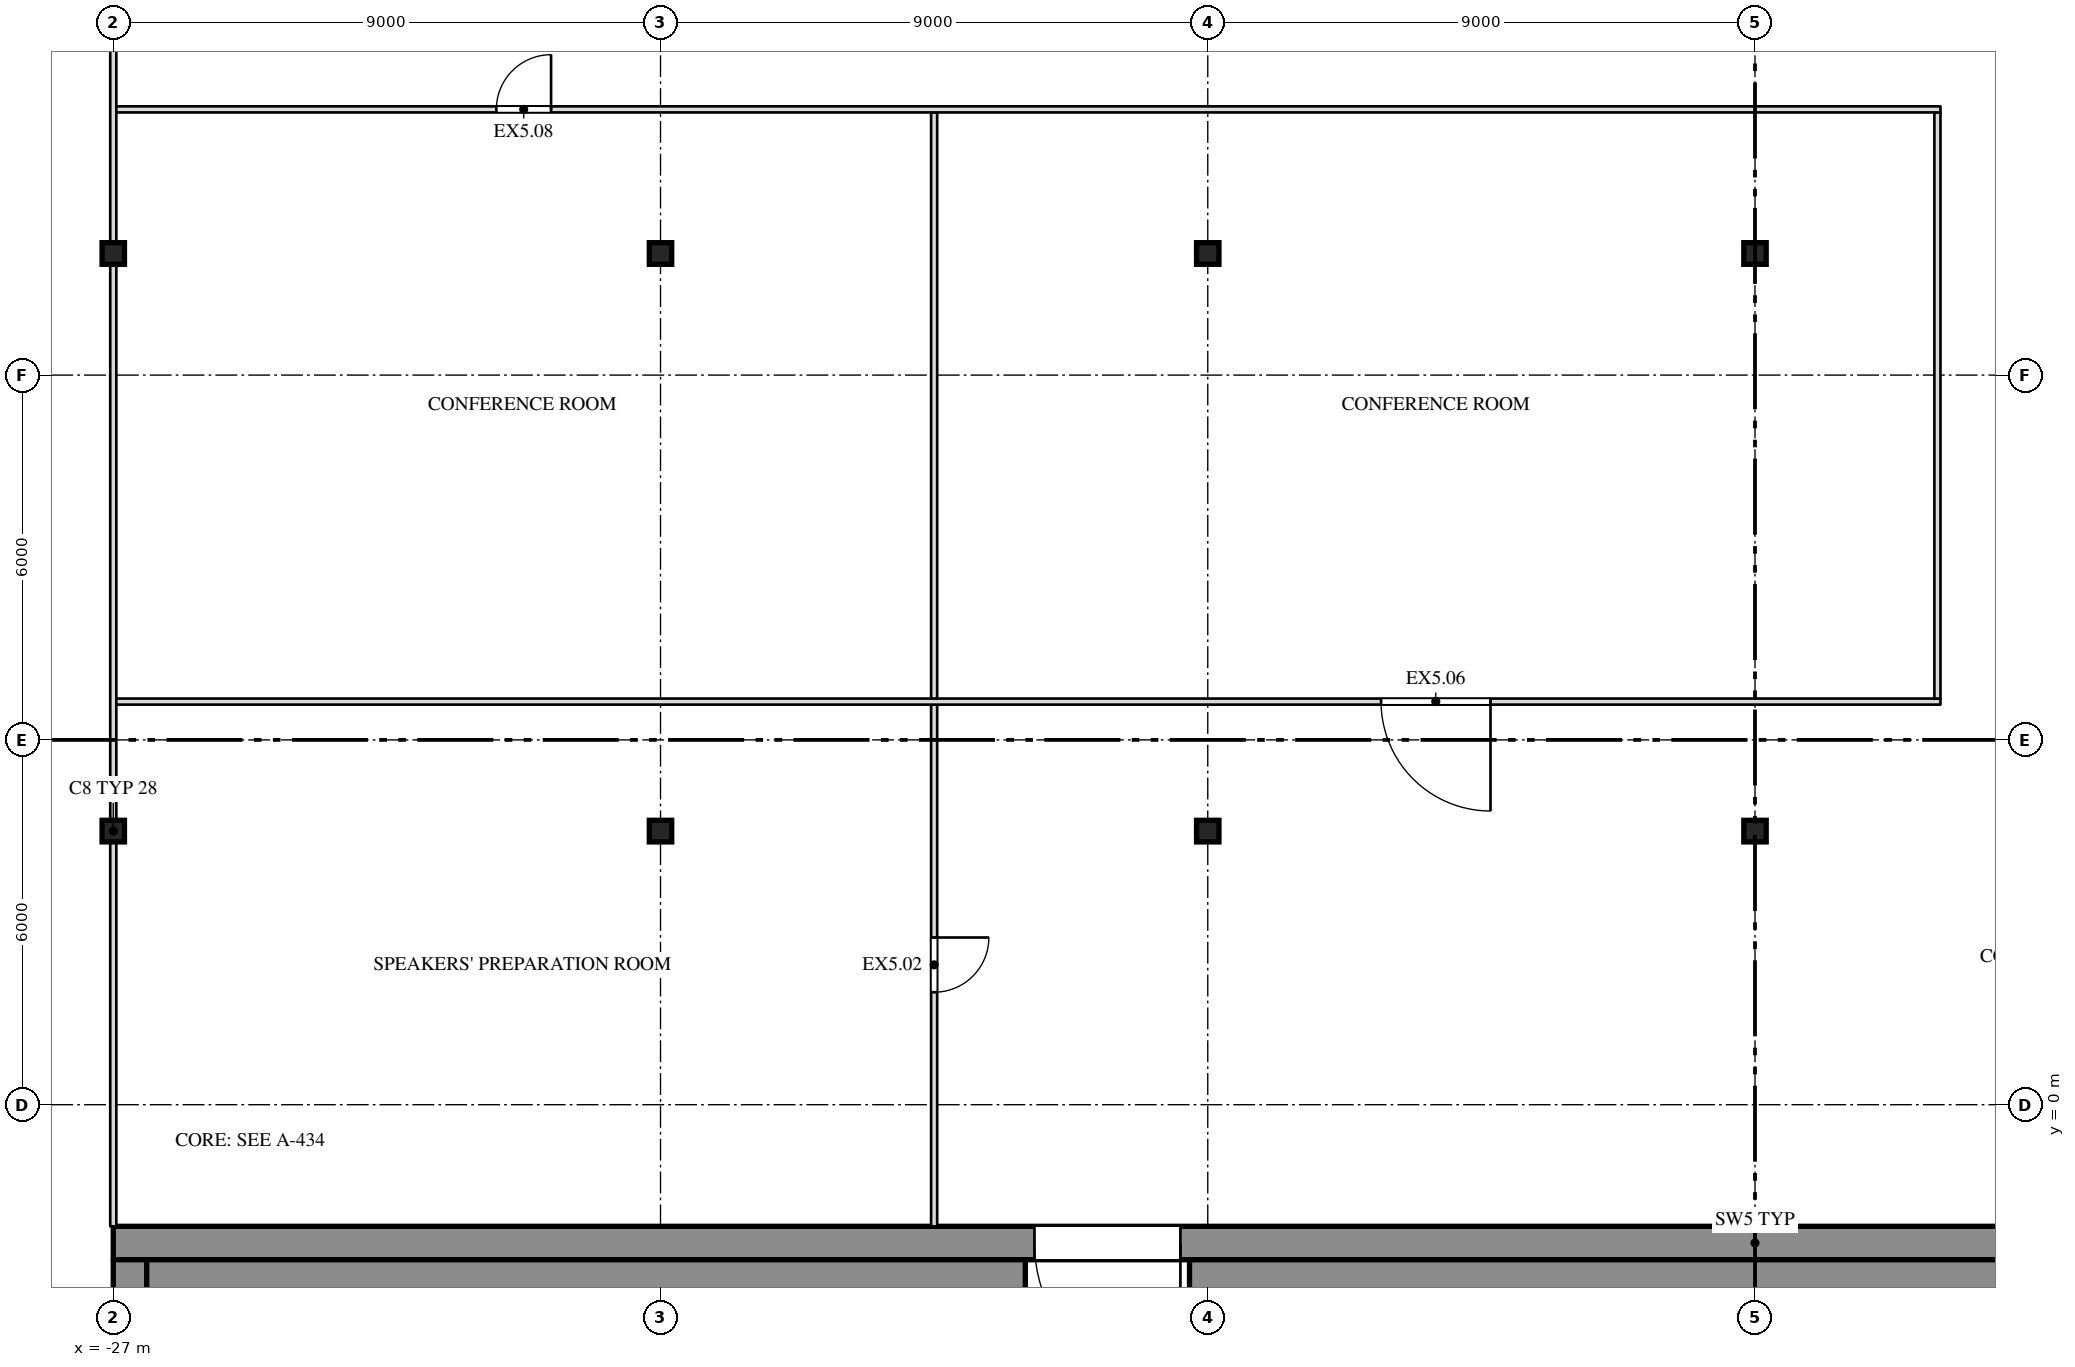
"""IFC4 building model, lengths in metres.
Left out: names, types, materials, properties, quantities, classifications, styles, units other than length and angle.
Written with IfcOpenShell. Run it as: python <this file> out.ifc"""

import sys

from ifc_helpers import new_model, si_unit, direction, frame, frame_2d, origin, origin_2d, place, context, subcontext, project, spatial, rectangle, i_section, extrude, element, fill, save


model = new_model("IFC4")
c1 = context("Model", 3, precision=1e-05, world=origin(), true_north=direction((0.0, 1.0)))
c2 = subcontext(c1, "Body", "Model", "MODEL_VIEW")
j1 = project(units=[si_unit("LENGTHUNIT", "METRE"), si_unit("PLANEANGLEUNIT", "RADIAN")], contexts=[c1])
p1 = place(None, origin())
s1 = spatial("IfcSite", under=j1, at=p1, CompositionType="ELEMENT")
p2 = place(p1, origin())
s2 = spatial("IfcBuilding", under=s1, at=p2, CompositionType="ELEMENT")
p3 = place(p2, frame((0.0, 0.0, 288.5)))
s3 = spatial("IfcBuildingStorey", under=s2, at=p3, CompositionType="ELEMENT", Elevation=288.5)
for number, where, z_axis, x_axis in (
    (1, (-27.0, 4.5, 0.0), (0.0, 0.0, 1.0), (1.0, 0.0, 0.0)),
    (2, (-18.0, 4.5, 0.0), (0.0, 0.0, 1.0), (1.0, 0.0, 0.0)),
    (3, (-9.0, 4.5, 0.0), (0.0, 0.0, 1.0), (1.0, 0.0, 0.0)),
    (4, (0.0, 4.5, 0.0), (0.0, 0.0, 1.0), (1.0, 0.0, 0.0)),
    (5, (-27.0, 14.0, 0.0), (0.0, 0.0, 1.0), (1.0, 0.0, 0.0)),
    (6, (-18.0, 14.0, 0.0), (0.0, 0.0, 1.0), (1.0, 0.0, 0.0)),
    (7, (-9.0, 14.0, 0.0), (0.0, 0.0, 1.0), (1.0, 0.0, 0.0)),
    (8, (0.0, 14.0, 0.0), (0.0, 0.0, 1.0), (1.0, 0.0, 0.0)),
):
    element("IfcColumn", number, at=place(p3, frame(where, z_axis=z_axis, x_axis=x_axis)), inside=s3, PredefinedType="COLUMN", context=c2, shape_type="SweptSolid", body=[
        extrude(i_section(OverallWidth=0.368, OverallDepth=0.356, WebThickness=0.011, FlangeThickness=0.018, at=origin_2d()), origin(), (0.0, 0.0, 1.0), 4.0),
    ])
p4 = place(p3, frame((-27.0, -2.275, 0.0), z_axis=(0.0, 0.0, 1.0), x_axis=(1.0, 0.0, 0.0)))
e9 = element("IfcWall", 9, at=p4, inside=s3, PredefinedType="SHEAR", context=c2, shape_type="SweptSolid", body=[
    extrude(rectangle(XDim=54.0, YDim=0.55, at=frame_2d((27.0, 0.0))), origin(), (0.0, 0.0, 1.0), 3.78),
])
p5 = place(p4, frame((15.15, 0.0, 0.0)))
e10 = element("IfcOpeningElement", 10, at=p5, cuts=e9, PredefinedType="OPENING", context=c2, shape_type="SweptSolid", body=[
    extrude(rectangle(XDim=2.4, YDim=2.1, at=frame_2d((1.2, 1.05))), frame((0.0, 0.287, 0.0), z_axis=(0.0, -1.0, 0.0), x_axis=(1.0, 0.0, 0.0)), (0.0, 0.0, 1.0), 0.574),
])
p6 = place(p4, frame((36.45, 0.0, 0.0)))
e11 = element("IfcOpeningElement", 11, at=p6, cuts=e9, PredefinedType="OPENING", context=c2, shape_type="SweptSolid", body=[
    extrude(rectangle(XDim=2.4, YDim=2.1, at=frame_2d((1.2, 1.05))), frame((0.0, 0.287, 0.0), z_axis=(0.0, -1.0, 0.0), x_axis=(1.0, 0.0, 0.0)), (0.0, 0.0, 1.0), 0.574),
])
p7 = place(p3, frame((-26.725, -13.45, 0.0), z_axis=(0.0, 0.0, 1.0), x_axis=(0.0, 1.0, 0.0)))
e12 = element("IfcWall", 12, at=p7, inside=s3, PredefinedType="SHEAR", context=c2, shape_type="SweptSolid", body=[
    extrude(rectangle(XDim=10.9, YDim=0.55, at=frame_2d((5.45, 0.0))), origin(), (0.0, 0.0, 1.0), 3.78),
])
p8 = place(p7, frame((4.662, 0.0, 0.0)))
e13 = element("IfcOpeningElement", 13, at=p8, cuts=e12, PredefinedType="OPENING", context=c2, shape_type="SweptSolid", body=[
    extrude(rectangle(XDim=2.4, YDim=2.1, at=frame_2d((1.2, 1.05))), frame((0.0, 0.287, 0.0), z_axis=(0.0, -1.0, 0.0), x_axis=(1.0, 0.0, 0.0)), (0.0, 0.0, 1.0), 0.574),
])
p9 = place(p3, frame((-26.45, -2.875, 0.0), z_axis=(0.0, 0.0, 1.0), x_axis=(1.0, 0.0, 0.0)))
e14 = element("IfcWall", 14, at=p9, inside=s3, PredefinedType="SHEAR", context=c2, shape_type="SweptSolid", body=[
    extrude(rectangle(XDim=14.45, YDim=0.65, at=frame_2d((7.225, 0.0))), origin(), (0.0, 0.0, 1.0), 3.78),
])
p10 = place(p3, frame((-9.3, -2.875, 0.0), z_axis=(0.0, 0.0, 1.0), x_axis=(1.0, 0.0, 0.0)))
e15 = element("IfcWall", 15, at=p10, inside=s3, PredefinedType="SHEAR", context=c2, shape_type="SweptSolid", body=[
    extrude(rectangle(XDim=18.6, YDim=0.65, at=frame_2d((9.3, 0.0))), origin(), (0.0, 0.0, 1.0), 3.78),
])
p11 = place(p3, frame((-27.0, -2.0, 0.0), z_axis=(0.0, 0.0, 1.0), x_axis=(0.0, 1.0, 0.0)))
e16 = element("IfcWall", 16, at=p11, inside=s3, PredefinedType="PARTITIONING", context=c2, shape_type="SweptSolid", body=[
    extrude(rectangle(XDim=6.322, YDim=0.1, at=frame_2d((3.161, 0.0))), origin(), (0.0, 0.0, 1.0), 3.247),
])
p12 = place(p3, frame((-27.0, 4.678, 0.0), z_axis=(0.0, 0.0, 1.0), x_axis=(0.0, 1.0, 0.0)))
e17 = element("IfcWall", 17, at=p12, inside=s3, PredefinedType="PARTITIONING", context=c2, shape_type="SweptSolid", body=[
    extrude(rectangle(XDim=9.145, YDim=0.1, at=frame_2d((4.572, 0.0))), origin(), (0.0, 0.0, 1.0), 3.247),
])
p13 = place(p3, frame((-27.0, 14.178, 0.0), z_axis=(0.0, 0.0, 1.0), x_axis=(0.0, 1.0, 0.0)))
e18 = element("IfcWall", 18, at=p13, inside=s3, PredefinedType="PARTITIONING", context=c2, shape_type="SweptSolid", body=[
    extrude(rectangle(XDim=7.012, YDim=0.1, at=frame_2d((3.506, 0.0))), origin(), (0.0, 0.0, 1.0), 3.247),
])
p14 = place(p3, frame((-13.5, -2.0, 0.0), z_axis=(0.0, 0.0, 1.0), x_axis=(0.0, 1.0, 0.0)))
e19 = element("IfcWall", 19, at=p14, inside=s3, PredefinedType="PARTITIONING", context=c2, shape_type="SweptSolid", body=[
    extrude(rectangle(XDim=8.58, YDim=0.1, at=frame_2d((4.29, 0.0))), origin(), (0.0, 0.0, 1.0), 3.254),
])
p15 = place(p14, frame((3.85, 0.0, 0.0)))
e20 = element("IfcOpeningElement", 20, at=p15, cuts=e19, PredefinedType="OPENING", context=c2, shape_type="SweptSolid", body=[
    extrude(rectangle(XDim=0.9, YDim=2.1, at=frame_2d((0.45, 1.05))), frame((0.0, 0.062, 0.0), z_axis=(0.0, -1.0, 0.0), x_axis=(1.0, 0.0, 0.0)), (0.0, 0.0, 1.0), 0.124),
])
p16 = place(p3, frame((-26.95, 6.63, 0.0), z_axis=(0.0, 0.0, 1.0), x_axis=(1.0, 0.0, 0.0)))
e21 = element("IfcWall", 21, at=p16, inside=s3, PredefinedType="PARTITIONING", context=c2, shape_type="SweptSolid", body=[
    extrude(rectangle(XDim=30.0, YDim=0.1, at=frame_2d((15.0, 0.0))), origin(), (0.0, 0.0, 1.0), 3.78),
])
p17 = place(p16, frame((20.8, 0.0, 0.0)))
e22 = element("IfcOpeningElement", 22, at=p17, cuts=e21, PredefinedType="OPENING", context=c2, shape_type="SweptSolid", body=[
    extrude(rectangle(XDim=1.8, YDim=2.1, at=frame_2d((0.9, 1.05))), frame((0.0, 0.062, 0.0), z_axis=(0.0, -1.0, 0.0), x_axis=(1.0, 0.0, 0.0)), (0.0, 0.0, 1.0), 0.124),
])
p18 = place(p3, frame((-13.5, 6.68, 0.0), z_axis=(0.0, 0.0, 1.0), x_axis=(0.0, 1.0, 0.0)))
e23 = element("IfcWall", 23, at=p18, inside=s3, PredefinedType="PARTITIONING", context=c2, shape_type="SweptSolid", body=[
    extrude(rectangle(XDim=9.64, YDim=0.1, at=frame_2d((4.82, 0.0))), origin(), (0.0, 0.0, 1.0), 3.254),
])
p19 = place(p3, frame((3.0, 6.68, 0.0), z_axis=(0.0, 0.0, 1.0), x_axis=(0.0, 1.0, 0.0)))
e24 = element("IfcWall", 24, at=p19, inside=s3, PredefinedType="PARTITIONING", context=c2, shape_type="SweptSolid", body=[
    extrude(rectangle(XDim=9.64, YDim=0.1, at=frame_2d((4.82, 0.0))), origin(), (0.0, 0.0, 1.0), 3.78),
])
p20 = place(p3, frame((-26.95, 16.37, 0.0), z_axis=(0.0, 0.0, 1.0), x_axis=(1.0, 0.0, 0.0)))
e25 = element("IfcWall", 25, at=p20, inside=s3, PredefinedType="PARTITIONING", context=c2, shape_type="SweptSolid", body=[
    extrude(rectangle(XDim=30.0, YDim=0.1, at=frame_2d((15.0, 0.0))), origin(), (0.0, 0.0, 1.0), 3.78),
])
p21 = place(p20, frame((6.25, 0.0, 0.0)))
e26 = element("IfcOpeningElement", 26, at=p21, cuts=e25, PredefinedType="OPENING", context=c2, shape_type="SweptSolid", body=[
    extrude(rectangle(XDim=0.9, YDim=2.1, at=frame_2d((0.45, 1.05))), frame((0.0, 0.062, 0.0), z_axis=(0.0, -1.0, 0.0), x_axis=(1.0, 0.0, 0.0)), (0.0, 0.0, 1.0), 0.124),
])
p22 = place(p15, origin())
e27 = element("IfcDoor", 27, at=p22, inside=s3, OperationType="SINGLE_SWING_LEFT", PredefinedType="DOOR", context=c2, shape_type="SweptSolid", body=[
    extrude(rectangle(XDim=0.9, YDim=2.1, at=frame_2d((0.45, 1.05))), frame((0.0, 0.025, 0.0), z_axis=(0.0, -1.0, 0.0), x_axis=(1.0, 0.0, 0.0)), (0.0, 0.0, 1.0), 0.05),
])
fill(e20, e27)
p23 = place(p17, origin())
e28 = element("IfcDoor", 28, at=p23, inside=s3, OperationType="DOUBLE_DOOR_SINGLE_SWING", PredefinedType="DOOR", context=c2, shape_type="SweptSolid", body=[
    extrude(rectangle(XDim=1.8, YDim=2.1, at=frame_2d((0.9, 1.05))), frame((0.0, 0.025, 0.0), z_axis=(0.0, -1.0, 0.0), x_axis=(1.0, 0.0, 0.0)), (0.0, 0.0, 1.0), 0.05),
])
fill(e22, e28)
p24 = place(p21, origin())
e29 = element("IfcDoor", 29, at=p24, inside=s3, OperationType="SINGLE_SWING_RIGHT", PredefinedType="DOOR", context=c2, shape_type="SweptSolid", body=[
    extrude(rectangle(XDim=0.9, YDim=2.1, at=frame_2d((0.45, 1.05))), frame((0.0, 0.025, 0.0), z_axis=(0.0, -1.0, 0.0), x_axis=(1.0, 0.0, 0.0)), (0.0, 0.0, 1.0), 0.05),
])
fill(e26, e29)
p25 = place(p5, origin())
e30 = element("IfcDoor", 30, at=p25, inside=s3, OperationType="DOUBLE_DOOR_SINGLE_SWING", PredefinedType="DOOR", context=c2, shape_type="SweptSolid", body=[
    extrude(rectangle(XDim=2.4, YDim=2.1, at=frame_2d((1.2, 1.05))), frame((0.0, 0.025, 0.0), z_axis=(0.0, -1.0, 0.0), x_axis=(1.0, 0.0, 0.0)), (0.0, 0.0, 1.0), 0.05),
])
fill(e10, e30)
save(model, sys.argv[1])
